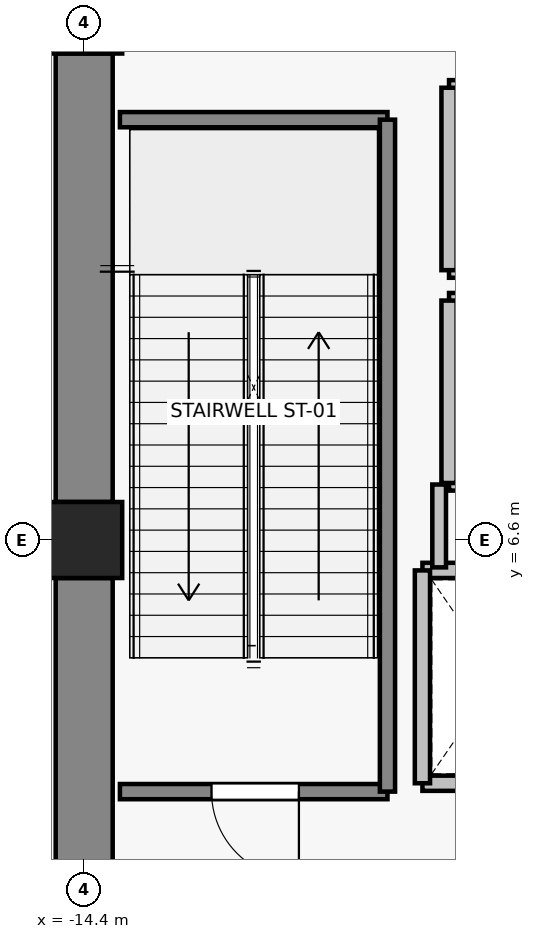
"""IFC4 building model, lengths in metres.
Left out: names, types, materials, properties, quantities, classifications, styles, units other than length and angle.
Written with IfcOpenShell. Run it as: python <this file> out.ifc"""

import sys

from ifc_helpers import new_model, si_unit, direction, frame, frame_2d, origin, origin_2d, place, context, subcontext, project, spatial, rectangle, extrude, source, transform, mapped, element, fill, save


model = new_model("IFC4")
c1 = context("Model", 3, precision=1e-05, world=origin(), true_north=direction((0.0, 1.0)))
c2 = subcontext(c1, "Body", "Model", "MODEL_VIEW")
j1 = project(units=[si_unit("LENGTHUNIT", "METRE"), si_unit("PLANEANGLEUNIT", "RADIAN")], contexts=[c1])
p1 = place(None, origin())
s1 = spatial("IfcSite", under=j1, at=p1, CompositionType="ELEMENT")
p2 = place(p1, origin())
s2 = spatial("IfcBuilding", under=s1, at=p2, CompositionType="ELEMENT")
p3 = place(p2, frame((0.0, 0.0, 139.6)))
s3 = spatial("IfcBuildingStorey", under=s2, at=p3, CompositionType="ELEMENT", Elevation=139.6)
for number, where, z_axis, x_axis in (
    (1, (-14.4, 6.6, 0.0), (0.0, 0.0, 1.0), (1.0, 0.0, 0.0)),
    (2, (-14.4, 13.5, 0.0), (0.0, 0.0, 1.0), (1.0, 0.0, 0.0)),
):
    element("IfcColumn", number, at=place(p3, frame(where, z_axis=z_axis, x_axis=x_axis)), inside=s3, PredefinedType="COLUMN", context=c2, shape_type="SweptSolid", body=[
        extrude(rectangle(XDim=1.0, YDim=1.0, at=origin_2d()), origin(), (0.0, 0.0, 1.0), 6.6),
    ])
p4 = place(p3, frame((-14.4, -0.7, 0.0), z_axis=(0.0, 0.0, 1.0), x_axis=(0.0, 1.0, 0.0)))
e3 = element("IfcWall", 3, at=p4, inside=s3, PredefinedType="SHEAR", context=c2, shape_type="SweptSolid", body=[
    extrude(rectangle(XDim=6.8, YDim=0.75, at=frame_2d((3.4, 0.0))), origin(), (0.0, 0.0, 1.0), 6.375),
])
p5 = place(p3, frame((-14.4, 7.1, 0.0), z_axis=(0.0, 0.0, 1.0), x_axis=(0.0, 1.0, 0.0)))
e4 = element("IfcWall", 4, at=p5, inside=s3, PredefinedType="SHEAR", context=c2, shape_type="SweptSolid", body=[
    extrude(rectangle(XDim=5.9, YDim=0.75, at=frame_2d((2.95, 0.0))), origin(), (0.0, 0.0, 1.0), 6.375),
])
p6 = place(p3, frame((-7.95, 3.4, 0.0), z_axis=(0.0, 0.0, 1.0), x_axis=(-1.0, 0.0, 0.0)))
e5 = element("IfcWall", 5, at=p6, inside=s3, PredefinedType="SOLIDWALL", context=c2, shape_type="SweptSolid", body=[
    extrude(rectangle(XDim=2.0, YDim=0.2, at=frame_2d((1.0, 0.0))), origin(), (0.0, 0.0, 1.0), 6.375),
])
p7 = place(p6, frame((0.45, 0.0, 0.0)))
e6 = element("IfcOpeningElement", 6, at=p7, cuts=e5, PredefinedType="OPENING", context=c2, shape_type="SweptSolid", body=[
    extrude(rectangle(XDim=1.1, YDim=2.2, at=frame_2d((0.55, 1.1))), frame((0.0, 0.11, 0.0), z_axis=(0.0, -1.0, 0.0), x_axis=(1.0, 0.0, 0.0)), (0.0, 0.0, 1.0), 0.22),
])
p8 = place(p3, frame((-9.95, 6.2, 0.0), z_axis=(0.0, 0.0, 1.0), x_axis=(1.0, 0.0, 0.0)))
e7 = element("IfcWall", 7, at=p8, inside=s3, PredefinedType="SOLIDWALL", context=c2, shape_type="SweptSolid", body=[
    extrude(rectangle(XDim=2.0, YDim=0.2, at=frame_2d((1.0, 0.0))), origin(), (0.0, 0.0, 1.0), 6.375),
])
p9 = place(p3, frame((-9.95, 3.4, 0.0), z_axis=(0.0, 0.0, 1.0), x_axis=(0.0, 1.0, 0.0)))
e8 = element("IfcWall", 8, at=p9, inside=s3, PredefinedType="SOLIDWALL", context=c2, shape_type="SweptSolid", body=[
    extrude(rectangle(XDim=2.8, YDim=0.2, at=frame_2d((1.4, 0.0))), origin(), (0.0, 0.0, 1.0), 6.375),
])
for number, where, z_axis, x_axis in (
    (9, (-7.4, 7.35, 0.0), (0.0, 0.0, 1.0), (-1.0, 0.0, 0.0)),
    (10, (-9.6, 9.75, 0.0), (0.0, 0.0, 1.0), (1.0, 0.0, 0.0)),
):
    element("IfcWall", number, at=place(p3, frame(where, z_axis=z_axis, x_axis=x_axis)), inside=s3, PredefinedType="SOLIDWALL", context=c2, shape_type="SweptSolid", body=[
        extrude(rectangle(XDim=2.2, YDim=0.2, at=frame_2d((1.1, 0.0))), origin(), (0.0, 0.0, 1.0), 5.865),
    ])
p10 = place(p3, frame((-9.6, 7.35, 0.0), z_axis=(0.0, 0.0, 1.0), x_axis=(0.0, 1.0, 0.0)))
e11 = element("IfcWall", 11, at=p10, inside=s3, PredefinedType="SOLIDWALL", context=c2, shape_type="SweptSolid", body=[
    extrude(rectangle(XDim=2.4, YDim=0.2, at=frame_2d((1.2, 0.0))), origin(), (0.0, 0.0, 1.0), 6.375),
])
for number, where, z_axis, x_axis in (
    (12, (-7.4, 10.15, 0.0), (0.0, 0.0, 1.0), (-1.0, 0.0, 0.0)),
    (13, (-9.6, 12.55, 0.0), (0.0, 0.0, 1.0), (1.0, 0.0, 0.0)),
):
    element("IfcWall", number, at=place(p3, frame(where, z_axis=z_axis, x_axis=x_axis)), inside=s3, PredefinedType="SOLIDWALL", context=c2, shape_type="SweptSolid", body=[
        extrude(rectangle(XDim=2.2, YDim=0.2, at=frame_2d((1.1, 0.0))), origin(), (0.0, 0.0, 1.0), 5.865),
    ])
p11 = place(p3, frame((-9.6, 10.15, 0.0), z_axis=(0.0, 0.0, 1.0), x_axis=(0.0, 1.0, 0.0)))
e14 = element("IfcWall", 14, at=p11, inside=s3, PredefinedType="SOLIDWALL", context=c2, shape_type="SweptSolid", body=[
    extrude(rectangle(XDim=2.4, YDim=0.2, at=frame_2d((1.2, 0.0))), origin(), (0.0, 0.0, 1.0), 6.375),
])
p12 = place(p3, frame((-10.41, 3.29, 0.0), z_axis=(0.0, 0.0, 1.0), x_axis=(-1.0, 0.0, 0.0)))
e15 = element("IfcWall", 15, at=p12, inside=s3, PredefinedType="SOLIDWALL", context=c2, shape_type="SweptSolid", body=[
    extrude(rectangle(XDim=3.52, YDim=0.2, at=frame_2d((1.76, 0.0))), origin(), (0.0, 0.0, 1.0), 6.375),
])
p13 = place(p12, frame((1.165, 0.0, 0.0)))
e16 = element("IfcOpeningElement", 16, at=p13, cuts=e15, PredefinedType="OPENING", context=c2, shape_type="SweptSolid", body=[
    extrude(rectangle(XDim=1.15, YDim=2.15, at=frame_2d((0.575, 1.075))), frame((0.0, 0.11, 0.0), z_axis=(0.0, -1.0, 0.0), x_axis=(1.0, 0.0, 0.0)), (0.0, 0.0, 1.0), 0.22),
])
p14 = place(p3, frame((-13.93, 12.13, 0.0), z_axis=(0.0, 0.0, 1.0), x_axis=(1.0, 0.0, 0.0)))
e17 = element("IfcWall", 17, at=p14, inside=s3, PredefinedType="SOLIDWALL", context=c2, shape_type="SweptSolid", body=[
    extrude(rectangle(XDim=3.52, YDim=0.2, at=frame_2d((1.76, 0.0))), origin(), (0.0, 0.0, 1.0), 6.375),
])
p15 = place(p3, frame((-10.41, 12.13, 0.0), z_axis=(0.0, 0.0, 1.0), x_axis=(0.0, -1.0, 0.0)))
e18 = element("IfcWall", 18, at=p15, inside=s3, PredefinedType="SOLIDWALL", context=c2, shape_type="SweptSolid", body=[
    extrude(rectangle(XDim=8.84, YDim=0.2, at=frame_2d((4.42, 0.0))), origin(), (0.0, 0.0, 1.0), 6.375),
])
p16 = place(p3, frame((-9.73, 6.24, 0.0), z_axis=(0.0, 0.0, 1.0), x_axis=(0.0, 1.0, 0.0)))
e19 = element("IfcWall", 19, at=p16, inside=s3, PredefinedType="PARTITIONING", context=c2, shape_type="SweptSolid", body=[
    extrude(rectangle(XDim=1.09, YDim=0.18, at=frame_2d((0.545, 0.0))), origin(), (0.0, 0.0, 1.0), 6.375),
])
m1 = source(origin(), c2, "Body", "SweptSolid", [
    extrude(rectangle(XDim=1.15, YDim=2.15, at=frame_2d((0.575, 1.075))), frame((0.0, 0.025, 0.0), z_axis=(0.0, -1.0, 0.0), x_axis=(1.0, 0.0, 0.0)), (0.0, 0.0, 1.0), 0.05),
])
p17 = place(p13, origin())
e20 = element("IfcDoor", 20, at=p17, inside=s3, OperationType="SINGLE_SWING_LEFT", PredefinedType="DOOR", context=c2, shape_type="MappedRepresentation", body=[
    mapped(m1, transform((0.0, 0.0, 0.0), x_axis=(1.0, 0.0, 0.0), y_axis=(0.0, 1.0, 0.0), z_axis=(0.0, 0.0, 1.0), scale=1.0)),
])
fill(e16, e20)
save(model, sys.argv[1])
